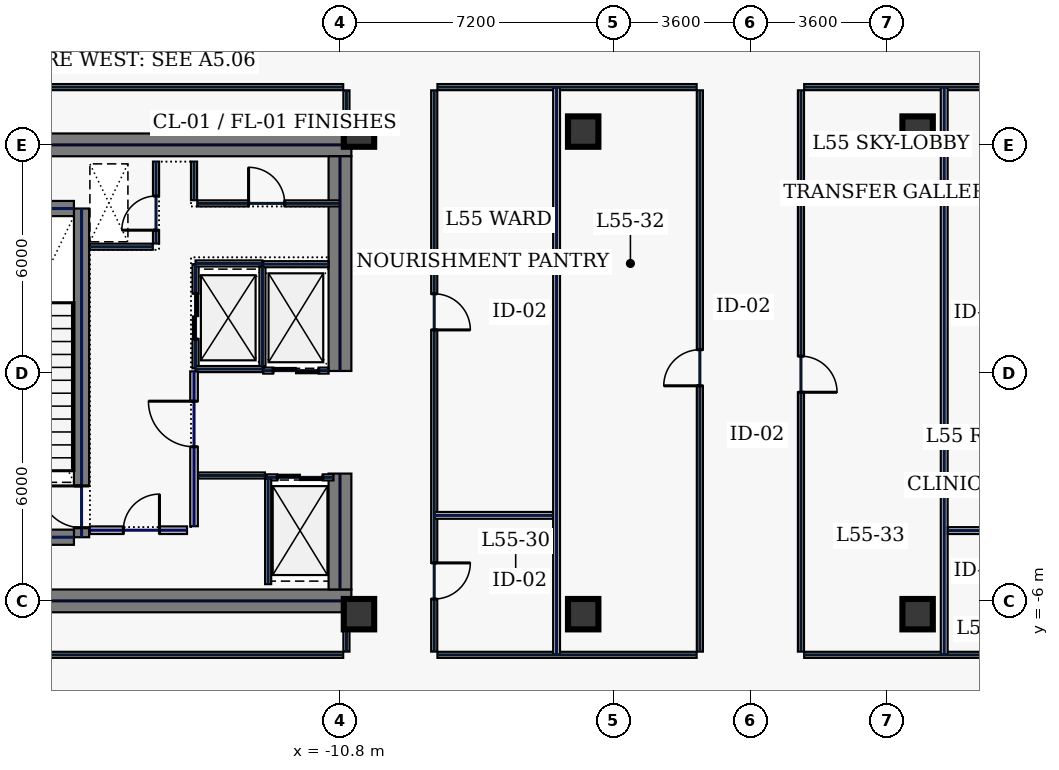
"""IFC4 building model, lengths in metres.
Left out: names, types, materials, properties, quantities, classifications, styles, units other than length and angle.
Written with IfcOpenShell. Run it as: python <this file> out.ifc"""

import sys

from ifc_helpers import new_model, si_unit, direction, frame, frame_2d, origin, origin_2d, place, context, subcontext, project, spatial, rectangle, hollow_rectangle, extrude, element, fill, save


model = new_model("IFC4")
c1 = context("Model", 3, precision=1e-05, world=origin(), true_north=direction((0.0, 1.0)))
c2 = subcontext(c1, "Body", "Model", "MODEL_VIEW")
j1 = project(units=[si_unit("LENGTHUNIT", "METRE"), si_unit("PLANEANGLEUNIT", "RADIAN")], contexts=[c1])
p1 = place(None, origin())
s1 = spatial("IfcSite", under=j1, at=p1, CompositionType="ELEMENT")
p2 = place(p1, origin())
s2 = spatial("IfcBuilding", under=s1, at=p2, CompositionType="ELEMENT")
p3 = place(p2, frame((0.0, 0.0, 238.2)))
s3 = spatial("IfcBuildingStorey", under=s2, at=p3, CompositionType="ELEMENT", Elevation=238.2)
for number, where, z_axis, x_axis in (
    (1, (-22.0, 6.0, 0.0), (0.0, 0.0, 1.0), (1.0, 0.0, 0.0)),
    (2, (-22.0, -6.0, 0.0), (0.0, 0.0, 1.0), (1.0, 0.0, 0.0)),
):
    element("IfcWall", number, at=place(p3, frame(where, z_axis=z_axis, x_axis=x_axis)), inside=s3, PredefinedType="SHEAR", context=c2, shape_type="SweptSolid", body=[
        extrude(rectangle(XDim=11.5, YDim=0.6, at=frame_2d((5.75, 0.0))), origin(), (0.0, 0.0, 1.0), 4.54),
    ])
p4 = place(p3, frame((-10.8, -5.7, 0.0), z_axis=(0.0, 0.0, 1.0), x_axis=(0.0, 1.0, 0.0)))
e3 = element("IfcWall", 3, at=p4, inside=s3, PredefinedType="SHEAR", context=c2, shape_type="SweptSolid", body=[
    extrude(rectangle(XDim=3.05, YDim=0.6, at=frame_2d((1.525, 0.0))), origin(), (0.0, 0.0, 1.0), 4.54),
])
p5 = place(p3, frame((-10.8, 0.05, 0.0), z_axis=(0.0, 0.0, 1.0), x_axis=(0.0, 1.0, 0.0)))
e4 = element("IfcWall", 4, at=p5, inside=s3, PredefinedType="SHEAR", context=c2, shape_type="SweptSolid", body=[
    extrude(rectangle(XDim=5.65, YDim=0.6, at=frame_2d((2.825, 0.0))), origin(), (0.0, 0.0, 1.0), 4.54),
])
p6 = place(p3, frame((-17.6, -4.325, 0.0), z_axis=(0.0, 0.0, 1.0), x_axis=(0.0, 1.0, 0.0)))
e5 = element("IfcWall", 5, at=p6, inside=s3, PredefinedType="SHEAR", context=c2, shape_type="SweptSolid", body=[
    extrude(rectangle(XDim=8.65, YDim=0.4, at=frame_2d((4.325, 0.0))), origin(), (0.0, 0.0, 1.0), 4.54),
])
p7 = place(p6, frame((0.25, 0.0, 0.0)))
e6 = element("IfcOpeningElement", 6, at=p7, cuts=e5, PredefinedType="OPENING", context=c2, shape_type="SweptSolid", body=[
    extrude(rectangle(XDim=1.1, YDim=2.2, at=frame_2d((0.55, 1.1))), frame((0.0, 0.21, 0.0), z_axis=(0.0, -1.0, 0.0), x_axis=(1.0, 0.0, 0.0)), (0.0, 0.0, 1.0), 0.42),
])
for number, where, z_axis, x_axis in (
    (7, (-21.2, -4.325, 0.0), (0.0, 0.0, 1.0), (1.0, 0.0, 0.0)),
    (8, (-21.2, 4.325, 0.0), (0.0, 0.0, 1.0), (1.0, 0.0, 0.0)),
):
    element("IfcWall", number, at=place(p3, frame(where, z_axis=z_axis, x_axis=x_axis)), inside=s3, PredefinedType="SHEAR", context=c2, shape_type="SweptSolid", body=[
        extrude(rectangle(XDim=3.4, YDim=0.4, at=frame_2d((1.7, 0.0))), origin(), (0.0, 0.0, 1.0), 4.54),
    ])
for number, where, z_axis, x_axis in (
    (9, (-10.3, -6.35, 0.0), (0.0, 0.0, 1.0), (1.0, 0.0, 0.0)),
    (10, (-10.3, 6.35, 0.0), (0.0, 0.0, 1.0), (1.0, 0.0, 0.0)),
    (11, (-4.4, -6.35, 0.0), (0.0, 0.0, 1.0), (1.0, 0.0, 0.0)),
    (12, (4.4, -6.35, 0.0), (0.0, 0.0, 1.0), (1.0, 0.0, 0.0)),
    (13, (-4.4, 6.35, 0.0), (0.0, 0.0, 1.0), (1.0, 0.0, 0.0)),
    (14, (4.4, 6.35, 0.0), (0.0, 0.0, 1.0), (1.0, 0.0, 0.0)),
):
    element("IfcColumn", number, at=place(p3, frame(where, z_axis=z_axis, x_axis=x_axis)), inside=s3, PredefinedType="COLUMN", context=c2, shape_type="SweptSolid", body=[
        extrude(hollow_rectangle(XDim=0.8, YDim=0.8, WallThickness=0.036, at=origin_2d()), origin(), (0.0, 0.0, 1.0), 4.54),
    ])
p8 = place(p3, frame((-14.6, 0.12, 0.0), z_axis=(0.0, 0.0, 1.0), x_axis=(0.0, 1.0, 0.0)))
e15 = element("IfcWall", 15, at=p8, inside=s3, PredefinedType="PARTITIONING", context=c2, shape_type="SweptSolid", body=[
    extrude(rectangle(XDim=2.74, YDim=0.16, at=frame_2d((1.37, 0.0))), origin(), (0.0, 0.0, 1.0), 4.54),
])
p9 = place(p8, frame((0.77, 0.0, 0.0)))
e16 = element("IfcOpeningElement", 16, at=p9, cuts=e15, PredefinedType="OPENING", context=c2, shape_type="SweptSolid", body=[
    extrude(rectangle(XDim=1.2, YDim=2.2, at=frame_2d((0.6, 1.1))), frame((0.0, 0.09, 0.0), z_axis=(0.0, -1.0, 0.0), x_axis=(1.0, 0.0, 0.0)), (0.0, 0.0, 1.0), 0.18),
])
for number, where, z_axis, x_axis in (
    (17, (-14.6, 0.1, 0.0), (0.0, 0.0, 1.0), (1.0, 0.0, 0.0)),
    (18, (-14.6, 2.88, 0.0), (0.0, 0.0, 1.0), (1.0, 0.0, 0.0)),
):
    element("IfcWall", number, at=place(p3, frame(where, z_axis=z_axis, x_axis=x_axis)), inside=s3, PredefinedType="PARTITIONING", context=c2, shape_type="SweptSolid", body=[
        extrude(rectangle(XDim=1.76, YDim=0.16, at=frame_2d((0.88, 0.0))), origin(), (0.0, 0.0, 1.0), 4.54),
    ])
p10 = place(p3, frame((-12.84, 0.18, 0.0), z_axis=(0.0, 0.0, 1.0), x_axis=(0.0, 1.0, 0.0)))
e19 = element("IfcWall", 19, at=p10, inside=s3, PredefinedType="PARTITIONING", context=c2, shape_type="SweptSolid", body=[
    extrude(rectangle(XDim=2.62, YDim=0.16, at=frame_2d((1.31, 0.0))), origin(), (0.0, 0.0, 1.0), 4.54),
])
p11 = place(p3, frame((-12.73, -2.75, 0.0), z_axis=(0.0, 0.0, 1.0), x_axis=(1.0, 0.0, 0.0)))
e20 = element("IfcWall", 20, at=p11, inside=s3, PredefinedType="PARTITIONING", context=c2, shape_type="SweptSolid", body=[
    extrude(rectangle(XDim=1.76, YDim=0.16, at=frame_2d((0.88, 0.0))), origin(), (0.0, 0.0, 1.0), 4.54),
])
p12 = place(p11, frame((0.28, 0.0, 0.0)))
e21 = element("IfcOpeningElement", 21, at=p12, cuts=e20, PredefinedType="OPENING", context=c2, shape_type="SweptSolid", body=[
    extrude(rectangle(XDim=1.2, YDim=2.2, at=frame_2d((0.6, 1.1))), frame((0.0, 0.09, 0.0), z_axis=(0.0, -1.0, 0.0), x_axis=(1.0, 0.0, 0.0)), (0.0, 0.0, 1.0), 0.18),
])
p13 = place(p3, frame((-12.82, 0.06, 0.0), z_axis=(0.0, 0.0, 1.0), x_axis=(1.0, 0.0, 0.0)))
e22 = element("IfcWall", 22, at=p13, inside=s3, PredefinedType="PARTITIONING", context=c2, shape_type="SweptSolid", body=[
    extrude(rectangle(XDim=1.72, YDim=0.16, at=frame_2d((0.86, 0.0))), origin(), (0.0, 0.0, 1.0), 4.54),
])
p14 = place(p13, frame((0.26, 0.0, 0.0)))
e23 = element("IfcOpeningElement", 23, at=p14, cuts=e22, PredefinedType="OPENING", context=c2, shape_type="SweptSolid", body=[
    extrude(rectangle(XDim=1.2, YDim=2.2, at=frame_2d((0.6, 1.1))), frame((0.0, 0.09, 0.0), z_axis=(0.0, -1.0, 0.0), x_axis=(1.0, 0.0, 0.0)), (0.0, 0.0, 1.0), 0.18),
])
p15 = place(p3, frame((-12.82, 2.86, 0.0), z_axis=(0.0, 0.0, 1.0), x_axis=(1.0, 0.0, 0.0)))
e24 = element("IfcWall", 24, at=p15, inside=s3, PredefinedType="PARTITIONING", context=c2, shape_type="SweptSolid", body=[
    extrude(rectangle(XDim=1.72, YDim=0.16, at=frame_2d((0.86, 0.0))), origin(), (0.0, 0.0, 1.0), 4.54),
])
p16 = place(p3, frame((-15.64, 3.405, 0.0), z_axis=(0.0, 0.0, 1.0), x_axis=(0.0, 1.0, 0.0)))
e25 = element("IfcWall", 25, at=p16, inside=s3, PredefinedType="PARTITIONING", context=c2, shape_type="SweptSolid", body=[
    extrude(rectangle(XDim=2.155, YDim=0.16, at=frame_2d((1.078, 0.0))), origin(), (0.0, 0.0, 1.0), 4.54),
])
p17 = place(p16, frame((0.35, 0.0, 0.0)))
e26 = element("IfcOpeningElement", 26, at=p17, cuts=e25, PredefinedType="OPENING", context=c2, shape_type="SweptSolid", body=[
    extrude(rectangle(XDim=0.9, YDim=2.2, at=frame_2d((0.45, 1.1))), frame((0.0, 0.09, 0.0), z_axis=(0.0, -1.0, 0.0), x_axis=(1.0, 0.0, 0.0)), (0.0, 0.0, 1.0), 0.18),
])
p18 = place(p3, frame((-17.38, 3.32, 0.0), z_axis=(0.0, 0.0, 1.0), x_axis=(1.0, 0.0, 0.0)))
e27 = element("IfcWall", 27, at=p18, inside=s3, PredefinedType="PARTITIONING", context=c2, shape_type="SweptSolid", body=[
    extrude(rectangle(XDim=1.655, YDim=0.16, at=frame_2d((0.827, 0.0))), origin(), (0.0, 0.0, 1.0), 4.54),
])
p19 = place(p3, frame((-17.38, -4.14, 0.0), z_axis=(0.0, 0.0, 1.0), x_axis=(1.0, 0.0, 0.0)))
e28 = element("IfcWall", 28, at=p19, inside=s3, PredefinedType="SOLIDWALL", context=c2, shape_type="SweptSolid", body=[
    extrude(rectangle(XDim=2.555, YDim=0.2, at=frame_2d((1.277, 0.0))), origin(), (0.0, 0.0, 1.0), 4.54),
])
p20 = place(p19, frame((0.88, 0.0, 0.0)))
e29 = element("IfcOpeningElement", 29, at=p20, cuts=e28, PredefinedType="OPENING", context=c2, shape_type="SweptSolid", body=[
    extrude(rectangle(XDim=0.95, YDim=2.2, at=frame_2d((0.475, 1.1))), frame((0.0, 0.11, 0.0), z_axis=(0.0, -1.0, 0.0), x_axis=(1.0, 0.0, 0.0)), (0.0, 0.0, 1.0), 0.22),
])
p21 = place(p3, frame((-14.535, -2.7, 0.0), z_axis=(0.0, 0.0, 1.0), x_axis=(1.0, 0.0, 0.0)))
e30 = element("IfcWall", 30, at=p21, inside=s3, PredefinedType="PARTITIONING", context=c2, shape_type="SweptSolid", body=[
    extrude(rectangle(XDim=1.76, YDim=0.16, at=frame_2d((0.88, 0.0))), origin(), (0.0, 0.0, 1.0), 4.54),
])
p22 = place(p3, frame((-12.69, -5.56, 0.0), z_axis=(0.0, 0.0, 1.0), x_axis=(0.0, 1.0, 0.0)))
e31 = element("IfcWall", 31, at=p22, inside=s3, PredefinedType="PARTITIONING", context=c2, shape_type="SweptSolid", body=[
    extrude(rectangle(XDim=2.775, YDim=0.16, at=frame_2d((1.388, 0.0))), origin(), (0.0, 0.0, 1.0), 4.54),
])
p23 = place(p3, frame((-14.555, 4.46, 0.0), z_axis=(0.0, 0.0, 1.0), x_axis=(1.0, 0.0, 0.0)))
e32 = element("IfcWall", 32, at=p23, inside=s3, PredefinedType="PARTITIONING", context=c2, shape_type="SweptSolid", body=[
    extrude(rectangle(XDim=3.755, YDim=0.16, at=frame_2d((1.877, 0.0))), origin(), (0.0, 0.0, 1.0), 4.54),
])
p24 = place(p23, frame((1.35, 0.0, 0.0)))
e33 = element("IfcOpeningElement", 33, at=p24, cuts=e32, PredefinedType="OPENING", context=c2, shape_type="SweptSolid", body=[
    extrude(rectangle(XDim=0.95, YDim=2.2, at=frame_2d((0.475, 1.1))), frame((0.0, 0.09, 0.0), z_axis=(0.0, -1.0, 0.0), x_axis=(1.0, 0.0, 0.0)), (0.0, 0.0, 1.0), 0.18),
])
p25 = place(p3, frame((-14.64, 4.545, 0.0), z_axis=(0.0, 0.0, 1.0), x_axis=(0.0, 1.0, 0.0)))
e34 = element("IfcWall", 34, at=p25, inside=s3, PredefinedType="PARTITIONING", context=c2, shape_type="SweptSolid", body=[
    extrude(rectangle(XDim=1.015, YDim=0.16, at=frame_2d((0.508, 0.0))), origin(), (0.0, 0.0, 1.0), 4.54),
])
p26 = place(p3, frame((-14.64, -4.035, 0.0), z_axis=(0.0, 0.0, 1.0), x_axis=(0.0, 1.0, 0.0)))
e35 = element("IfcWall", 35, at=p26, inside=s3, PredefinedType="SOLIDWALL", context=c2, shape_type="SweptSolid", body=[
    extrude(rectangle(XDim=4.075, YDim=0.2, at=frame_2d((2.038, 0.0))), origin(), (0.0, 0.0, 1.0), 4.54),
])
p27 = place(p26, frame((2.09, 0.0, 0.0)))
e36 = element("IfcOpeningElement", 36, at=p27, cuts=e35, PredefinedType="OPENING", context=c2, shape_type="SweptSolid", body=[
    extrude(rectangle(XDim=1.2, YDim=2.2, at=frame_2d((0.6, 1.1))), frame((0.0, 0.11, 0.0), z_axis=(0.0, -1.0, 0.0), x_axis=(1.0, 0.0, 0.0)), (0.0, 0.0, 1.0), 0.22),
])
p28 = place(p3, frame((-24.815, -7.42, 0.0), z_axis=(0.0, 0.0, 1.0), x_axis=(1.0, 0.0, 0.0)))
e37 = element("IfcWall", 37, at=p28, inside=s3, PredefinedType="PARTITIONING", context=c2, shape_type="SweptSolid", body=[
    extrude(rectangle(XDim=14.1, YDim=0.16, at=frame_2d((7.05, 0.0))), origin(), (0.0, 0.0, 1.0), 4.54),
])
p29 = place(p3, frame((-10.63, -7.335, 0.0), z_axis=(0.0, 0.0, 1.0), x_axis=(0.0, 1.0, 0.0)))
e38 = element("IfcWall", 38, at=p29, inside=s3, PredefinedType="PARTITIONING", context=c2, shape_type="SweptSolid", body=[
    extrude(rectangle(XDim=0.915, YDim=0.16, at=frame_2d((0.458, 0.0))), origin(), (0.0, 0.0, 1.0), 4.54),
])
p30 = place(p3, frame((-10.63, 6.42, 0.0), z_axis=(0.0, 0.0, 1.0), x_axis=(0.0, 1.0, 0.0)))
e39 = element("IfcWall", 39, at=p30, inside=s3, PredefinedType="PARTITIONING", context=c2, shape_type="SweptSolid", body=[
    extrude(rectangle(XDim=1.015, YDim=0.16, at=frame_2d((0.508, 0.0))), origin(), (0.0, 0.0, 1.0), 4.54),
])
p31 = place(p3, frame((-10.715, 7.52, 0.0), z_axis=(0.0, 0.0, 1.0), x_axis=(-1.0, 0.0, 0.0)))
e40 = element("IfcWall", 40, at=p31, inside=s3, PredefinedType="PARTITIONING", context=c2, shape_type="SweptSolid", body=[
    extrude(rectangle(XDim=14.1, YDim=0.16, at=frame_2d((7.05, 0.0))), origin(), (0.0, 0.0, 1.0), 4.54),
])
p32 = place(p3, frame((8.235, 7.52, 0.0), z_axis=(0.0, 0.0, 1.0), x_axis=(-1.0, 0.0, 0.0)))
e41 = element("IfcWall", 41, at=p32, inside=s3, PredefinedType="PARTITIONING", context=c2, shape_type="SweptSolid", body=[
    extrude(rectangle(XDim=6.82, YDim=0.16, at=frame_2d((3.41, 0.0))), origin(), (0.0, 0.0, 1.0), 4.54),
])
p33 = place(p3, frame((1.33, 7.435, 0.0), z_axis=(0.0, 0.0, 1.0), x_axis=(0.0, -1.0, 0.0)))
e42 = element("IfcWall", 42, at=p33, inside=s3, PredefinedType="PARTITIONING", context=c2, shape_type="SweptSolid", body=[
    extrude(rectangle(XDim=14.77, YDim=0.16, at=frame_2d((7.385, 0.0))), origin(), (0.0, 0.0, 1.0), 4.54),
])
p34 = place(p33, frame((6.995, 0.0, 0.0)))
e43 = element("IfcOpeningElement", 43, at=p34, cuts=e42, PredefinedType="OPENING", context=c2, shape_type="SweptSolid", body=[
    extrude(rectangle(XDim=0.95, YDim=2.2, at=frame_2d((0.475, 1.1))), frame((0.0, 0.09, 0.0), z_axis=(0.0, -1.0, 0.0), x_axis=(1.0, 0.0, 0.0)), (0.0, 0.0, 1.0), 0.18),
])
p35 = place(p3, frame((1.415, -7.42, 0.0), z_axis=(0.0, 0.0, 1.0), x_axis=(1.0, 0.0, 0.0)))
e44 = element("IfcWall", 44, at=p35, inside=s3, PredefinedType="PARTITIONING", context=c2, shape_type="SweptSolid", body=[
    extrude(rectangle(XDim=6.82, YDim=0.16, at=frame_2d((3.41, 0.0))), origin(), (0.0, 0.0, 1.0), 4.54),
])
p36 = place(p3, frame((-1.33, -7.335, 0.0), z_axis=(0.0, 0.0, 1.0), x_axis=(0.0, 1.0, 0.0)))
e45 = element("IfcWall", 45, at=p36, inside=s3, PredefinedType="PARTITIONING", context=c2, shape_type="SweptSolid", body=[
    extrude(rectangle(XDim=14.77, YDim=0.16, at=frame_2d((7.385, 0.0))), origin(), (0.0, 0.0, 1.0), 4.54),
])
p37 = place(p36, frame((6.995, 0.0, 0.0)))
e46 = element("IfcOpeningElement", 46, at=p37, cuts=e45, PredefinedType="OPENING", context=c2, shape_type="SweptSolid", body=[
    extrude(rectangle(XDim=0.95, YDim=2.2, at=frame_2d((0.475, 1.1))), frame((0.0, 0.09, 0.0), z_axis=(0.0, -1.0, 0.0), x_axis=(1.0, 0.0, 0.0)), (0.0, 0.0, 1.0), 0.18),
])
p38 = place(p3, frame((-1.415, 7.52, 0.0), z_axis=(0.0, 0.0, 1.0), x_axis=(-1.0, 0.0, 0.0)))
e47 = element("IfcWall", 47, at=p38, inside=s3, PredefinedType="PARTITIONING", context=c2, shape_type="SweptSolid", body=[
    extrude(rectangle(XDim=6.82, YDim=0.16, at=frame_2d((3.41, 0.0))), origin(), (0.0, 0.0, 1.0), 4.54),
])
p39 = place(p3, frame((-8.32, 7.435, 0.0), z_axis=(0.0, 0.0, 1.0), x_axis=(0.0, -1.0, 0.0)))
e48 = element("IfcWall", 48, at=p39, inside=s3, PredefinedType="PARTITIONING", context=c2, shape_type="SweptSolid", body=[
    extrude(rectangle(XDim=14.77, YDim=0.16, at=frame_2d((7.385, 0.0))), origin(), (0.0, 0.0, 1.0), 4.54),
])
p40 = place(p39, frame((12.436, 0.0, 0.0)))
e49 = element("IfcOpeningElement", 49, at=p40, cuts=e48, PredefinedType="OPENING", context=c2, shape_type="SweptSolid", body=[
    extrude(rectangle(XDim=0.95, YDim=2.2, at=frame_2d((0.475, 1.1))), frame((0.0, 0.09, 0.0), z_axis=(0.0, -1.0, 0.0), x_axis=(1.0, 0.0, 0.0)), (0.0, 0.0, 1.0), 0.18),
])
p41 = place(p39, frame((5.354, 0.0, 0.0)))
e50 = element("IfcOpeningElement", 50, at=p41, cuts=e48, PredefinedType="OPENING", context=c2, shape_type="SweptSolid", body=[
    extrude(rectangle(XDim=0.95, YDim=2.2, at=frame_2d((0.475, 1.1))), frame((0.0, 0.09, 0.0), z_axis=(0.0, -1.0, 0.0), x_axis=(1.0, 0.0, 0.0)), (0.0, 0.0, 1.0), 0.18),
])
p42 = place(p3, frame((-8.235, -7.42, 0.0), z_axis=(0.0, 0.0, 1.0), x_axis=(1.0, 0.0, 0.0)))
e51 = element("IfcWall", 51, at=p42, inside=s3, PredefinedType="PARTITIONING", context=c2, shape_type="SweptSolid", body=[
    extrude(rectangle(XDim=6.82, YDim=0.16, at=frame_2d((3.41, 0.0))), origin(), (0.0, 0.0, 1.0), 4.54),
])
for number, where, z_axis, x_axis in (
    (52, (-5.1, -7.415, 0.0), (0.0, 0.0, 1.0), (0.0, 1.0, 0.0)),
    (53, (5.1, -7.415, 0.0), (0.0, 0.0, 1.0), (0.0, 1.0, 0.0)),
):
    element("IfcWall", number, at=place(p3, frame(where, z_axis=z_axis, x_axis=x_axis)), inside=s3, PredefinedType="PARTITIONING", context=c2, shape_type="SweptSolid", body=[
        extrude(rectangle(XDim=14.93, YDim=0.18, at=frame_2d((7.465, 0.0))), origin(), (0.0, 0.0, 1.0), 4.54),
    ])
for number, where, z_axis, x_axis in (
    (54, (-8.315, -3.75, 0.0), (0.0, 0.0, 1.0), (1.0, 0.0, 0.0)),
    (55, (5.195, -4.15, 0.0), (0.0, 0.0, 1.0), (1.0, 0.0, 0.0)),
):
    element("IfcWall", number, at=place(p3, frame(where, z_axis=z_axis, x_axis=x_axis)), inside=s3, PredefinedType="PARTITIONING", context=c2, shape_type="SweptSolid", body=[
        extrude(rectangle(XDim=3.12, YDim=0.18, at=frame_2d((1.56, 0.0))), origin(), (0.0, 0.0, 1.0), 4.54),
    ])
p43 = place(p7, origin())
e56 = element("IfcDoor", 56, at=p43, inside=s3, OperationType="SINGLE_SWING_RIGHT", PredefinedType="DOOR", context=c2, shape_type="SweptSolid", body=[
    extrude(rectangle(XDim=1.1, YDim=2.2, at=frame_2d((0.55, 1.1))), frame((0.0, 0.025, 0.0), z_axis=(0.0, -1.0, 0.0), x_axis=(1.0, 0.0, 0.0)), (0.0, 0.0, 1.0), 0.05),
])
fill(e6, e56)
p44 = place(p9, origin())
e57 = element("IfcDoor", 57, at=p44, inside=s3, OperationType="SLIDING_TO_LEFT", PredefinedType="DOOR", context=c2, shape_type="SweptSolid", body=[
    extrude(rectangle(XDim=1.2, YDim=2.2, at=frame_2d((0.6, 1.1))), frame((0.0, 0.025, 0.0), z_axis=(0.0, -1.0, 0.0), x_axis=(1.0, 0.0, 0.0)), (0.0, 0.0, 1.0), 0.05),
])
fill(e16, e57)
p45 = place(p12, origin())
e58 = element("IfcDoor", 58, at=p45, inside=s3, OperationType="SLIDING_TO_LEFT", PredefinedType="DOOR", context=c2, shape_type="SweptSolid", body=[
    extrude(rectangle(XDim=1.2, YDim=2.2, at=frame_2d((0.6, 1.1))), frame((0.0, 0.025, 0.0), z_axis=(0.0, -1.0, 0.0), x_axis=(1.0, 0.0, 0.0)), (0.0, 0.0, 1.0), 0.05),
])
fill(e21, e58)
p46 = place(p14, origin())
e59 = element("IfcDoor", 59, at=p46, inside=s3, OperationType="SLIDING_TO_LEFT", PredefinedType="DOOR", context=c2, shape_type="SweptSolid", body=[
    extrude(rectangle(XDim=1.2, YDim=2.2, at=frame_2d((0.6, 1.1))), frame((0.0, 0.025, 0.0), z_axis=(0.0, -1.0, 0.0), x_axis=(1.0, 0.0, 0.0)), (0.0, 0.0, 1.0), 0.05),
])
fill(e23, e59)
p47 = place(p17, origin())
e60 = element("IfcDoor", 60, at=p47, inside=s3, OperationType="SINGLE_SWING_LEFT", PredefinedType="DOOR", context=c2, shape_type="SweptSolid", body=[
    extrude(rectangle(XDim=0.9, YDim=2.2, at=frame_2d((0.45, 1.1))), frame((0.0, 0.025, 0.0), z_axis=(0.0, -1.0, 0.0), x_axis=(1.0, 0.0, 0.0)), (0.0, 0.0, 1.0), 0.05),
])
fill(e26, e60)
p48 = place(p20, origin())
e61 = element("IfcDoor", 61, at=p48, inside=s3, OperationType="SINGLE_SWING_RIGHT", PredefinedType="DOOR", context=c2, shape_type="SweptSolid", body=[
    extrude(rectangle(XDim=0.95, YDim=2.2, at=frame_2d((0.475, 1.1))), frame((0.0, 0.025, 0.0), z_axis=(0.0, -1.0, 0.0), x_axis=(1.0, 0.0, 0.0)), (0.0, 0.0, 1.0), 0.05),
])
fill(e29, e61)
p49 = place(p24, origin())
e62 = element("IfcDoor", 62, at=p49, inside=s3, OperationType="SINGLE_SWING_LEFT", PredefinedType="DOOR", context=c2, shape_type="SweptSolid", body=[
    extrude(rectangle(XDim=0.95, YDim=2.2, at=frame_2d((0.475, 1.1))), frame((0.0, 0.025, 0.0), z_axis=(0.0, -1.0, 0.0), x_axis=(1.0, 0.0, 0.0)), (0.0, 0.0, 1.0), 0.05),
])
fill(e33, e62)
p50 = place(p27, origin())
e63 = element("IfcDoor", 63, at=p50, inside=s3, OperationType="SINGLE_SWING_RIGHT", PredefinedType="DOOR", context=c2, shape_type="SweptSolid", body=[
    extrude(rectangle(XDim=1.2, YDim=2.2, at=frame_2d((0.6, 1.1))), frame((0.0, 0.025, 0.0), z_axis=(0.0, -1.0, 0.0), x_axis=(1.0, 0.0, 0.0)), (0.0, 0.0, 1.0), 0.05),
])
fill(e36, e63)
p51 = place(p40, origin())
e64 = element("IfcDoor", 64, at=p51, inside=s3, OperationType="SINGLE_SWING_LEFT", PredefinedType="DOOR", context=c2, shape_type="SweptSolid", body=[
    extrude(rectangle(XDim=0.95, YDim=2.2, at=frame_2d((0.475, 1.1))), frame((0.0, 0.025, 0.0), z_axis=(0.0, -1.0, 0.0), x_axis=(1.0, 0.0, 0.0)), (0.0, 0.0, 1.0), 0.05),
])
fill(e49, e64)
p52 = place(p41, origin())
e65 = element("IfcDoor", 65, at=p52, inside=s3, OperationType="SINGLE_SWING_RIGHT", PredefinedType="DOOR", context=c2, shape_type="SweptSolid", body=[
    extrude(rectangle(XDim=0.95, YDim=2.2, at=frame_2d((0.475, 1.1))), frame((0.0, 0.025, 0.0), z_axis=(0.0, -1.0, 0.0), x_axis=(1.0, 0.0, 0.0)), (0.0, 0.0, 1.0), 0.05),
])
fill(e50, e65)
p53 = place(p37, origin())
e66 = element("IfcDoor", 66, at=p53, inside=s3, OperationType="SINGLE_SWING_LEFT", PredefinedType="DOOR", context=c2, shape_type="SweptSolid", body=[
    extrude(rectangle(XDim=0.95, YDim=2.2, at=frame_2d((0.475, 1.1))), frame((0.0, 0.025, 0.0), z_axis=(0.0, -1.0, 0.0), x_axis=(1.0, 0.0, 0.0)), (0.0, 0.0, 1.0), 0.05),
])
fill(e46, e66)
p54 = place(p34, origin())
e67 = element("IfcDoor", 67, at=p54, inside=s3, OperationType="SINGLE_SWING_RIGHT", PredefinedType="DOOR", context=c2, shape_type="SweptSolid", body=[
    extrude(rectangle(XDim=0.95, YDim=2.2, at=frame_2d((0.475, 1.1))), frame((0.0, 0.025, 0.0), z_axis=(0.0, -1.0, 0.0), x_axis=(1.0, 0.0, 0.0)), (0.0, 0.0, 1.0), 0.05),
])
fill(e43, e67)
save(model, sys.argv[1])
